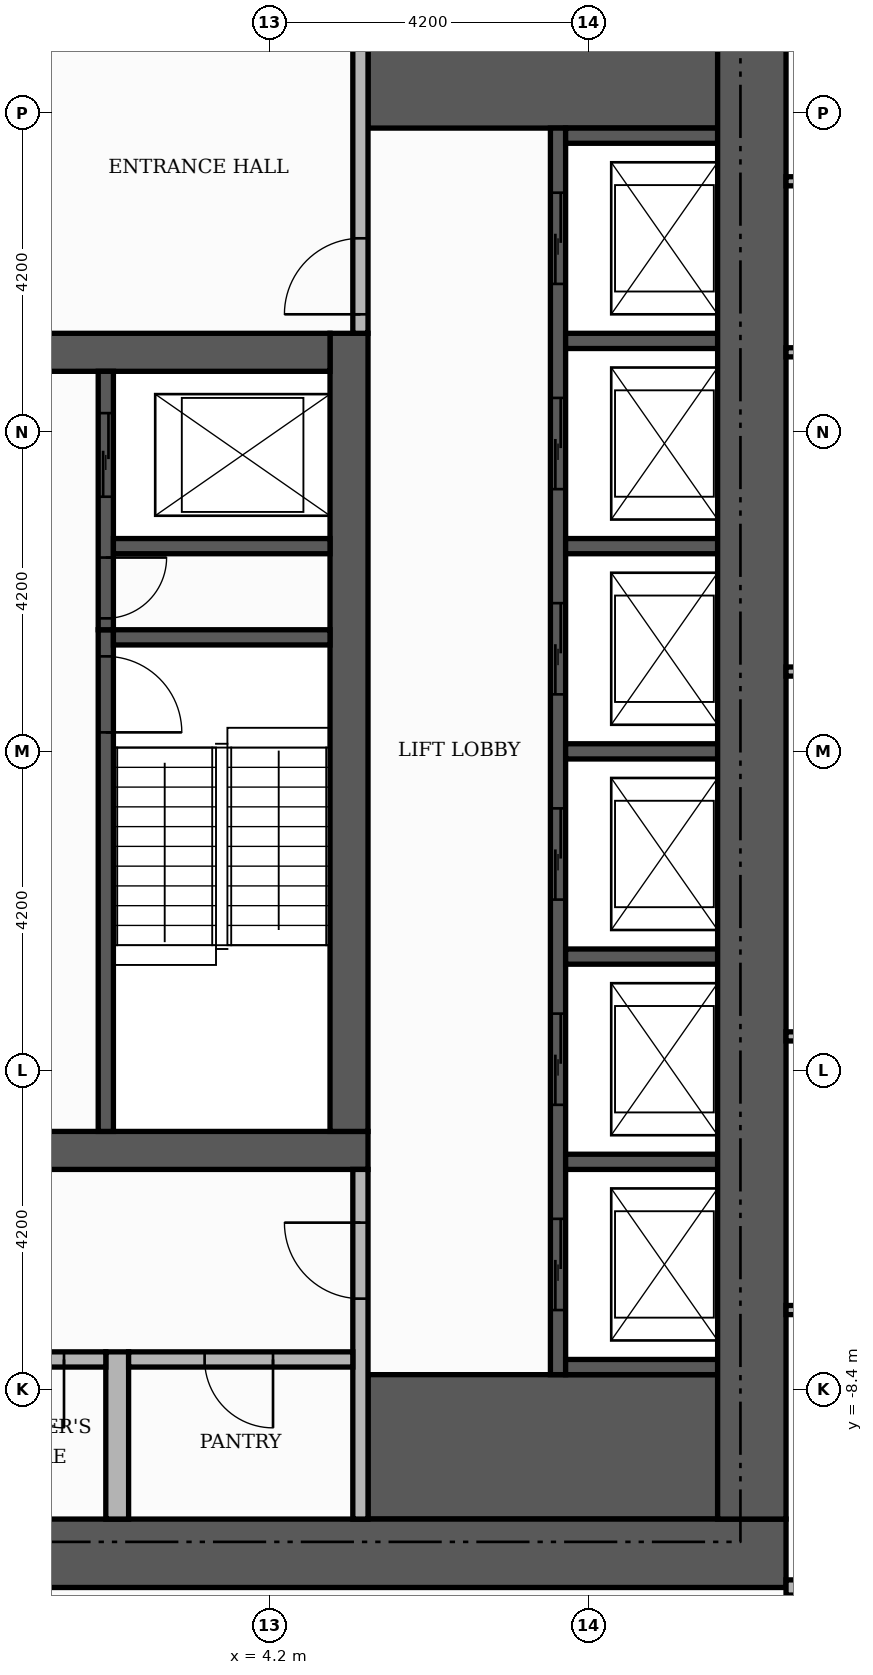
"""IFC4 building model, lengths in metres.
Left out: names, types, materials, properties, quantities, classifications, styles, units other than length and angle.
Written with IfcOpenShell. Run it as: python <this file> out.ifc"""

import sys

from ifc_helpers import new_model, si_unit, direction, frame, frame_2d, origin, place, context, subcontext, project, spatial, rectangle, extrude, element, fill, save


model = new_model("IFC4")
c1 = context("Model", 3, precision=1e-05, world=origin(), true_north=direction((0.0, 1.0)))
c2 = subcontext(c1, "Body", "Model", "MODEL_VIEW")
j1 = project(units=[si_unit("LENGTHUNIT", "METRE"), si_unit("PLANEANGLEUNIT", "RADIAN")], contexts=[c1])
p1 = place(None, origin())
s1 = spatial("IfcSite", under=j1, at=p1, CompositionType="ELEMENT")
p2 = place(p1, origin())
s2 = spatial("IfcBuilding", under=s1, at=p2, CompositionType="ELEMENT")
p3 = place(p2, frame((0.0, 0.0, 149.4)))
s3 = spatial("IfcBuildingStorey", under=s2, at=p3, CompositionType="ELEMENT", Elevation=149.4)
p4 = place(p3, frame((-5.5, -5.25, 0.0), z_axis=(0.0, 0.0, 1.0), x_axis=(1.0, 0.0, 0.0)))
e1 = element("IfcWall", 1, at=p4, inside=s3, PredefinedType="SHEAR", context=c2, shape_type="SweptSolid", body=[
    extrude(rectangle(XDim=11.0, YDim=0.5, at=frame_2d((5.5, 0.0))), origin(), (0.0, 0.0, 1.0), 3.48),
])
p5 = place(p4, frame((4.9, 0.0, 0.0)))
e2 = element("IfcOpeningElement", 2, at=p5, cuts=e1, PredefinedType="OPENING", context=c2, shape_type="SweptSolid", body=[
    extrude(rectangle(XDim=1.2, YDim=2.1, at=frame_2d((0.6, 1.05))), frame((0.0, 0.26, 0.0), z_axis=(0.0, -1.0, 0.0), x_axis=(1.0, 0.0, 0.0)), (0.0, 0.0, 1.0), 0.52),
])
p6 = place(p3, frame((5.25, -5.0, 0.0), z_axis=(0.0, 0.0, 1.0), x_axis=(0.0, 1.0, 0.0)))
e3 = element("IfcWall", 3, at=p6, inside=s3, PredefinedType="SHEAR", context=c2, shape_type="SweptSolid", body=[
    extrude(rectangle(XDim=10.5, YDim=0.5, at=frame_2d((5.25, 0.0))), origin(), (0.0, 0.0, 1.0), 3.48),
])
p7 = place(p3, frame((-5.0, 5.25, 0.0), z_axis=(0.0, 0.0, 1.0), x_axis=(1.0, 0.0, 0.0)))
e4 = element("IfcWall", 4, at=p7, inside=s3, PredefinedType="SHEAR", context=c2, shape_type="SweptSolid", body=[
    extrude(rectangle(XDim=10.0, YDim=0.5, at=frame_2d((5.0, 0.0))), origin(), (0.0, 0.0, 1.0), 3.48),
])
p8 = place(p7, frame((4.4, 0.0, 0.0)))
e5 = element("IfcOpeningElement", 5, at=p8, cuts=e4, PredefinedType="OPENING", context=c2, shape_type="SweptSolid", body=[
    extrude(rectangle(XDim=1.2, YDim=2.1, at=frame_2d((0.6, 1.05))), frame((0.0, 0.26, 0.0), z_axis=(0.0, -1.0, 0.0), x_axis=(1.0, 0.0, 0.0)), (0.0, 0.0, 1.0), 0.52),
])
for number, where, z_axis, x_axis in (
    (6, (5.5, -9.15, 0.0), (0.0, 0.0, 1.0), (1.0, 0.0, 0.0)),
    (7, (5.5, 9.15, 0.0), (0.0, 0.0, 1.0), (1.0, 0.0, 0.0)),
):
    element("IfcWall", number, at=place(p3, frame(where, z_axis=z_axis, x_axis=x_axis)), inside=s3, PredefinedType="SHEAR", context=c2, shape_type="SweptSolid", body=[
        extrude(rectangle(XDim=4.6, YDim=1.9, at=frame_2d((2.3, 0.0))), origin(), (0.0, 0.0, 1.0), 3.48),
    ])
p9 = place(p3, frame((2.05, -5.0, 0.0), z_axis=(0.0, 0.0, 1.0), x_axis=(0.0, 1.0, 0.0)))
e8 = element("IfcWall", 8, at=p9, inside=s3, PredefinedType="SHEAR", context=c2, shape_type="SweptSolid", body=[
    extrude(rectangle(XDim=6.6, YDim=0.2, at=frame_2d((3.3, 0.0))), origin(), (0.0, 0.0, 1.0), 3.48),
])
p10 = place(p9, frame((5.25, 0.0, 0.0)))
e9 = element("IfcOpeningElement", 9, at=p10, cuts=e8, PredefinedType="OPENING", context=c2, shape_type="SweptSolid", body=[
    extrude(rectangle(XDim=1.0, YDim=2.1, at=frame_2d((0.5, 1.05))), frame((0.0, 0.11, 0.0), z_axis=(0.0, -1.0, 0.0), x_axis=(1.0, 0.0, 0.0)), (0.0, 0.0, 1.0), 0.22),
])
p11 = place(p3, frame((2.15, 1.5, 0.0), z_axis=(0.0, 0.0, 1.0), x_axis=(1.0, 0.0, 0.0)))
e10 = element("IfcWall", 10, at=p11, inside=s3, PredefinedType="SHEAR", context=c2, shape_type="SweptSolid", body=[
    extrude(rectangle(XDim=2.85, YDim=0.2, at=frame_2d((1.425, 0.0))), origin(), (0.0, 0.0, 1.0), 3.48),
])
p12 = place(p3, frame((8.0, -8.2, 0.0), z_axis=(0.0, 0.0, 1.0), x_axis=(0.0, 1.0, 0.0)))
e11 = element("IfcWall", 11, at=p12, inside=s3, PredefinedType="SHEAR", context=c2, shape_type="SweptSolid", body=[
    extrude(rectangle(XDim=16.4, YDim=0.2, at=frame_2d((8.2, 0.0))), origin(), (0.0, 0.0, 1.0), 3.48),
])
p13 = place(p12, frame((0.85, 0.0, 0.0)))
e12 = element("IfcOpeningElement", 12, at=p13, cuts=e11, PredefinedType="OPENING", context=c2, shape_type="SweptSolid", body=[
    extrude(rectangle(XDim=1.2, YDim=2.1, at=frame_2d((0.6, 1.05))), frame((0.0, 0.11, 0.0), z_axis=(0.0, -1.0, 0.0), x_axis=(1.0, 0.0, 0.0)), (0.0, 0.0, 1.0), 0.22),
])
p14 = place(p12, frame((3.55, 0.0, 0.0)))
e13 = element("IfcOpeningElement", 13, at=p14, cuts=e11, PredefinedType="OPENING", context=c2, shape_type="SweptSolid", body=[
    extrude(rectangle(XDim=1.2, YDim=2.1, at=frame_2d((0.6, 1.05))), frame((0.0, 0.11, 0.0), z_axis=(0.0, -1.0, 0.0), x_axis=(1.0, 0.0, 0.0)), (0.0, 0.0, 1.0), 0.22),
])
p15 = place(p12, frame((6.25, 0.0, 0.0)))
e14 = element("IfcOpeningElement", 14, at=p15, cuts=e11, PredefinedType="OPENING", context=c2, shape_type="SweptSolid", body=[
    extrude(rectangle(XDim=1.2, YDim=2.1, at=frame_2d((0.6, 1.05))), frame((0.0, 0.11, 0.0), z_axis=(0.0, -1.0, 0.0), x_axis=(1.0, 0.0, 0.0)), (0.0, 0.0, 1.0), 0.22),
])
p16 = place(p12, frame((8.95, 0.0, 0.0)))
e15 = element("IfcOpeningElement", 15, at=p16, cuts=e11, PredefinedType="OPENING", context=c2, shape_type="SweptSolid", body=[
    extrude(rectangle(XDim=1.2, YDim=2.1, at=frame_2d((0.6, 1.05))), frame((0.0, 0.11, 0.0), z_axis=(0.0, -1.0, 0.0), x_axis=(1.0, 0.0, 0.0)), (0.0, 0.0, 1.0), 0.22),
])
p17 = place(p12, frame((11.65, 0.0, 0.0)))
e16 = element("IfcOpeningElement", 16, at=p17, cuts=e11, PredefinedType="OPENING", context=c2, shape_type="SweptSolid", body=[
    extrude(rectangle(XDim=1.2, YDim=2.1, at=frame_2d((0.6, 1.05))), frame((0.0, 0.11, 0.0), z_axis=(0.0, -1.0, 0.0), x_axis=(1.0, 0.0, 0.0)), (0.0, 0.0, 1.0), 0.22),
])
p18 = place(p12, frame((14.35, 0.0, 0.0)))
e17 = element("IfcOpeningElement", 17, at=p18, cuts=e11, PredefinedType="OPENING", context=c2, shape_type="SweptSolid", body=[
    extrude(rectangle(XDim=1.2, YDim=2.1, at=frame_2d((0.6, 1.05))), frame((0.0, 0.11, 0.0), z_axis=(0.0, -1.0, 0.0), x_axis=(1.0, 0.0, 0.0)), (0.0, 0.0, 1.0), 0.22),
])
for number, where, z_axis, x_axis in (
    (18, (8.1, -8.1, 0.0), (0.0, 0.0, 1.0), (1.0, 0.0, 0.0)),
    (19, (8.1, -5.4, 0.0), (0.0, 0.0, 1.0), (1.0, 0.0, 0.0)),
    (20, (8.1, -2.7, 0.0), (0.0, 0.0, 1.0), (1.0, 0.0, 0.0)),
    (21, (8.1, 0.0, 0.0), (0.0, 0.0, 1.0), (1.0, 0.0, 0.0)),
):
    element("IfcWall", number, at=place(p3, frame(where, z_axis=z_axis, x_axis=x_axis)), inside=s3, PredefinedType="SHEAR", context=c2, shape_type="SweptSolid", body=[
        extrude(rectangle(XDim=2.0, YDim=0.2, at=frame_2d((1.0, 0.0))), origin(), (0.0, 0.0, 1.0), 3.48),
    ])
p19 = place(p3, frame((2.05, 1.6, 0.0), z_axis=(0.0, 0.0, 1.0), x_axis=(0.0, 1.0, 0.0)))
e22 = element("IfcWall", 22, at=p19, inside=s3, PredefinedType="SHEAR", context=c2, shape_type="SweptSolid", body=[
    extrude(rectangle(XDim=3.4, YDim=0.2, at=frame_2d((1.7, 0.0))), origin(), (0.0, 0.0, 1.0), 3.48),
])
p20 = place(p19, frame((1.75, 0.0, 0.0)))
e23 = element("IfcOpeningElement", 23, at=p20, cuts=e22, PredefinedType="OPENING", context=c2, shape_type="SweptSolid", body=[
    extrude(rectangle(XDim=1.1, YDim=2.1, at=frame_2d((0.55, 1.05))), frame((0.0, 0.11, 0.0), z_axis=(0.0, -1.0, 0.0), x_axis=(1.0, 0.0, 0.0)), (0.0, 0.0, 1.0), 0.22),
])
p21 = place(p19, frame((0.15, 0.0, 0.0)))
e24 = element("IfcOpeningElement", 24, at=p21, cuts=e22, PredefinedType="OPENING", context=c2, shape_type="SweptSolid", body=[
    extrude(rectangle(XDim=0.8, YDim=2.1, at=frame_2d((0.4, 1.05))), frame((0.0, 0.11, 0.0), z_axis=(0.0, -1.0, 0.0), x_axis=(1.0, 0.0, 0.0)), (0.0, 0.0, 1.0), 0.22),
])
p22 = place(p3, frame((2.15, 2.7, 0.0), z_axis=(0.0, 0.0, 1.0), x_axis=(1.0, 0.0, 0.0)))
e25 = element("IfcWall", 25, at=p22, inside=s3, PredefinedType="SHEAR", context=c2, shape_type="SweptSolid", body=[
    extrude(rectangle(XDim=2.85, YDim=0.2, at=frame_2d((1.425, 0.0))), origin(), (0.0, 0.0, 1.0), 3.48),
])
for number, where, z_axis, x_axis in (
    (26, (8.1, 2.7, 0.0), (0.0, 0.0, 1.0), (1.0, 0.0, 0.0)),
    (27, (8.1, 5.4, 0.0), (0.0, 0.0, 1.0), (1.0, 0.0, 0.0)),
    (28, (8.1, 8.1, 0.0), (0.0, 0.0, 1.0), (1.0, 0.0, 0.0)),
):
    element("IfcWall", number, at=place(p3, frame(where, z_axis=z_axis, x_axis=x_axis)), inside=s3, PredefinedType="SHEAR", context=c2, shape_type="SweptSolid", body=[
        extrude(rectangle(XDim=2.0, YDim=0.2, at=frame_2d((1.0, 0.0))), origin(), (0.0, 0.0, 1.0), 3.48),
    ])
p23 = place(p3, frame((-11.0, -10.55, 0.0), z_axis=(0.0, 0.0, 1.0), x_axis=(1.0, 0.0, 0.0)))
e29 = element("IfcWall", 29, at=p23, inside=s3, PredefinedType="SHEAR", context=c2, shape_type="SweptSolid", body=[
    extrude(rectangle(XDim=22.0, YDim=0.9, at=frame_2d((11.0, 0.0))), origin(), (0.0, 0.0, 1.0), 3.48),
])
p24 = place(p23, frame((7.4, 0.0, 0.0)))
e30 = element("IfcOpeningElement", 30, at=p24, cuts=e29, PredefinedType="OPENING", context=c2, shape_type="SweptSolid", body=[
    extrude(rectangle(XDim=1.8, YDim=2.2, at=frame_2d((0.9, 1.1))), frame((0.0, 0.46, 0.0), z_axis=(0.0, -1.0, 0.0), x_axis=(1.0, 0.0, 0.0)), (0.0, 0.0, 1.0), 0.92),
])
p25 = place(p3, frame((10.55, -10.1, 0.0), z_axis=(0.0, 0.0, 1.0), x_axis=(0.0, 1.0, 0.0)))
e31 = element("IfcWall", 31, at=p25, inside=s3, PredefinedType="SHEAR", context=c2, shape_type="SweptSolid", body=[
    extrude(rectangle(XDim=20.2, YDim=0.9, at=frame_2d((10.1, 0.0))), origin(), (0.0, 0.0, 1.0), 3.48),
])
p26 = place(p3, frame((2.2, -10.1, 0.0), z_axis=(0.0, 0.0, 1.0), x_axis=(0.0, 1.0, 0.0)))
e32 = element("IfcWall", 32, at=p26, inside=s3, PredefinedType="PARTITIONING", context=c2, shape_type="SweptSolid", body=[
    extrude(rectangle(XDim=2.2, YDim=0.3, at=frame_2d((1.1, 0.0))), origin(), (0.0, 0.0, 1.0), 3.48),
])
p27 = place(p3, frame((5.4, -10.1, 0.0), z_axis=(0.0, 0.0, 1.0), x_axis=(0.0, 1.0, 0.0)))
e33 = element("IfcWall", 33, at=p27, inside=s3, PredefinedType="PARTITIONING", context=c2, shape_type="SweptSolid", body=[
    extrude(rectangle(XDim=4.6, YDim=0.2, at=frame_2d((2.3, 0.0))), origin(), (0.0, 0.0, 1.0), 3.48),
])
p28 = place(p27, frame((2.9, 0.0, 0.0)))
e34 = element("IfcOpeningElement", 34, at=p28, cuts=e33, PredefinedType="OPENING", context=c2, shape_type="SweptSolid", body=[
    extrude(rectangle(XDim=1.0, YDim=2.1, at=frame_2d((0.5, 1.05))), frame((0.0, 0.11, 0.0), z_axis=(0.0, -1.0, 0.0), x_axis=(1.0, 0.0, 0.0)), (0.0, 0.0, 1.0), 0.22),
])
p29 = place(p3, frame((0.1, -8.0, 0.0), z_axis=(0.0, 0.0, 1.0), x_axis=(1.0, 0.0, 0.0)))
e35 = element("IfcWall", 35, at=p29, inside=s3, PredefinedType="PARTITIONING", context=c2, shape_type="SweptSolid", body=[
    extrude(rectangle(XDim=1.95, YDim=0.2, at=frame_2d((0.975, 0.0))), origin(), (0.0, 0.0, 1.0), 3.48),
])
p30 = place(p29, frame((0.5, 0.0, 0.0)))
e36 = element("IfcOpeningElement", 36, at=p30, cuts=e35, PredefinedType="OPENING", context=c2, shape_type="SweptSolid", body=[
    extrude(rectangle(XDim=0.9, YDim=2.1, at=frame_2d((0.45, 1.05))), frame((0.0, 0.11, 0.0), z_axis=(0.0, -1.0, 0.0), x_axis=(1.0, 0.0, 0.0)), (0.0, 0.0, 1.0), 0.22),
])
p31 = place(p3, frame((2.35, -8.0, 0.0), z_axis=(0.0, 0.0, 1.0), x_axis=(1.0, 0.0, 0.0)))
e37 = element("IfcWall", 37, at=p31, inside=s3, PredefinedType="PARTITIONING", context=c2, shape_type="SweptSolid", body=[
    extrude(rectangle(XDim=2.95, YDim=0.2, at=frame_2d((1.475, 0.0))), origin(), (0.0, 0.0, 1.0), 3.48),
])
p32 = place(p31, frame((1.0, 0.0, 0.0)))
e38 = element("IfcOpeningElement", 38, at=p32, cuts=e37, PredefinedType="OPENING", context=c2, shape_type="SweptSolid", body=[
    extrude(rectangle(XDim=0.9, YDim=2.1, at=frame_2d((0.45, 1.05))), frame((0.0, 0.11, 0.0), z_axis=(0.0, -1.0, 0.0), x_axis=(1.0, 0.0, 0.0)), (0.0, 0.0, 1.0), 0.22),
])
p33 = place(p3, frame((5.4, 5.5, 0.0), z_axis=(0.0, 0.0, 1.0), x_axis=(0.0, 1.0, 0.0)))
e39 = element("IfcWall", 39, at=p33, inside=s3, PredefinedType="PARTITIONING", context=c2, shape_type="SweptSolid", body=[
    extrude(rectangle(XDim=4.6, YDim=0.2, at=frame_2d((2.3, 0.0))), origin(), (0.0, 0.0, 1.0), 3.48),
])
p34 = place(p33, frame((0.25, 0.0, 0.0)))
e40 = element("IfcOpeningElement", 40, at=p34, cuts=e39, PredefinedType="OPENING", context=c2, shape_type="SweptSolid", body=[
    extrude(rectangle(XDim=1.0, YDim=2.1, at=frame_2d((0.5, 1.05))), frame((0.0, 0.11, 0.0), z_axis=(0.0, -1.0, 0.0), x_axis=(1.0, 0.0, 0.0)), (0.0, 0.0, 1.0), 0.22),
])
p35 = place(p3, frame((11.0, -11.0, 0.0), z_axis=(0.0, 0.0, 1.0), x_axis=(1.0, 0.0, 0.0)))
e41 = element("IfcWall", 41, at=p35, inside=s3, PredefinedType="PARTITIONING", context=c2, shape_type="SweptSolid", body=[
    extrude(rectangle(XDim=2.65, YDim=0.2, at=frame_2d((1.325, 0.0))), origin(), (0.0, 0.0, 1.0), 3.48),
])
p36 = place(p35, frame((0.775, 0.0, 0.0)))
e42 = element("IfcOpeningElement", 42, at=p36, cuts=e41, PredefinedType="OPENING", context=c2, shape_type="SweptSolid", body=[
    extrude(rectangle(XDim=1.1, YDim=2.4, at=frame_2d((0.55, 1.2))), frame((0.0, 0.11, 0.0), z_axis=(0.0, -1.0, 0.0), x_axis=(1.0, 0.0, 0.0)), (0.0, 0.0, 1.0), 0.22),
])
p37 = place(p3, frame((11.0, -7.35, 0.0), z_axis=(0.0, 0.0, 1.0), x_axis=(1.0, 0.0, 0.0)))
e43 = element("IfcWall", 43, at=p37, inside=s3, PredefinedType="PARTITIONING", context=c2, shape_type="SweptSolid", body=[
    extrude(rectangle(XDim=7.32, YDim=0.12, at=frame_2d((3.66, 0.0))), origin(), (0.0, 0.0, 1.0), 3.48),
])
p38 = place(p37, frame((3.21, 0.0, 0.0)))
e44 = element("IfcOpeningElement", 44, at=p38, cuts=e43, PredefinedType="OPENING", context=c2, shape_type="SweptSolid", body=[
    extrude(rectangle(XDim=0.9, YDim=2.1, at=frame_2d((0.45, 1.05))), frame((0.0, 0.07, 0.0), z_axis=(0.0, -1.0, 0.0), x_axis=(1.0, 0.0, 0.0)), (0.0, 0.0, 1.0), 0.14),
])
for number, where, z_axis, x_axis in (
    (45, (11.0, -3.75, 0.0), (0.0, 0.0, 1.0), (1.0, 0.0, 0.0)),
    (46, (11.0, 1.05, 0.0), (0.0, 0.0, 1.0), (1.0, 0.0, 0.0)),
    (47, (11.0, 5.25, 0.0), (0.0, 0.0, 1.0), (1.0, 0.0, 0.0)),
    (48, (11.0, 7.5, 0.0), (0.0, 0.0, 1.0), (1.0, 0.0, 0.0)),
):
    element("IfcWall", number, at=place(p3, frame(where, z_axis=z_axis, x_axis=x_axis)), inside=s3, PredefinedType="PARTITIONING", context=c2, shape_type="SweptSolid", body=[
        extrude(rectangle(XDim=7.32, YDim=0.12, at=frame_2d((3.66, 0.0))), origin(), (0.0, 0.0, 1.0), 3.48),
    ])
p39 = place(p13, origin())
e49 = element("IfcDoor", 49, at=p39, inside=s3, OperationType="SLIDING_TO_LEFT", PredefinedType="DOOR", context=c2, shape_type="SweptSolid", body=[
    extrude(rectangle(XDim=1.2, YDim=2.1, at=frame_2d((0.6, 1.05))), frame((0.0, 0.025, 0.0), z_axis=(0.0, -1.0, 0.0), x_axis=(1.0, 0.0, 0.0)), (0.0, 0.0, 1.0), 0.05),
])
fill(e12, e49)
p40 = place(p14, origin())
e50 = element("IfcDoor", 50, at=p40, inside=s3, OperationType="SLIDING_TO_LEFT", PredefinedType="DOOR", context=c2, shape_type="SweptSolid", body=[
    extrude(rectangle(XDim=1.2, YDim=2.1, at=frame_2d((0.6, 1.05))), frame((0.0, 0.025, 0.0), z_axis=(0.0, -1.0, 0.0), x_axis=(1.0, 0.0, 0.0)), (0.0, 0.0, 1.0), 0.05),
])
fill(e13, e50)
p41 = place(p15, origin())
e51 = element("IfcDoor", 51, at=p41, inside=s3, OperationType="SLIDING_TO_LEFT", PredefinedType="DOOR", context=c2, shape_type="SweptSolid", body=[
    extrude(rectangle(XDim=1.2, YDim=2.1, at=frame_2d((0.6, 1.05))), frame((0.0, 0.025, 0.0), z_axis=(0.0, -1.0, 0.0), x_axis=(1.0, 0.0, 0.0)), (0.0, 0.0, 1.0), 0.05),
])
fill(e14, e51)
p42 = place(p16, origin())
e52 = element("IfcDoor", 52, at=p42, inside=s3, OperationType="SLIDING_TO_LEFT", PredefinedType="DOOR", context=c2, shape_type="SweptSolid", body=[
    extrude(rectangle(XDim=1.2, YDim=2.1, at=frame_2d((0.6, 1.05))), frame((0.0, 0.025, 0.0), z_axis=(0.0, -1.0, 0.0), x_axis=(1.0, 0.0, 0.0)), (0.0, 0.0, 1.0), 0.05),
])
fill(e15, e52)
p43 = place(p17, origin())
e53 = element("IfcDoor", 53, at=p43, inside=s3, OperationType="SLIDING_TO_LEFT", PredefinedType="DOOR", context=c2, shape_type="SweptSolid", body=[
    extrude(rectangle(XDim=1.2, YDim=2.1, at=frame_2d((0.6, 1.05))), frame((0.0, 0.025, 0.0), z_axis=(0.0, -1.0, 0.0), x_axis=(1.0, 0.0, 0.0)), (0.0, 0.0, 1.0), 0.05),
])
fill(e16, e53)
p44 = place(p18, origin())
e54 = element("IfcDoor", 54, at=p44, inside=s3, OperationType="SLIDING_TO_LEFT", PredefinedType="DOOR", context=c2, shape_type="SweptSolid", body=[
    extrude(rectangle(XDim=1.2, YDim=2.1, at=frame_2d((0.6, 1.05))), frame((0.0, 0.025, 0.0), z_axis=(0.0, -1.0, 0.0), x_axis=(1.0, 0.0, 0.0)), (0.0, 0.0, 1.0), 0.05),
])
fill(e17, e54)
p45 = place(p20, origin())
e55 = element("IfcDoor", 55, at=p45, inside=s3, OperationType="SLIDING_TO_LEFT", PredefinedType="DOOR", context=c2, shape_type="SweptSolid", body=[
    extrude(rectangle(XDim=1.1, YDim=2.1, at=frame_2d((0.55, 1.05))), frame((0.0, 0.025, 0.0), z_axis=(0.0, -1.0, 0.0), x_axis=(1.0, 0.0, 0.0)), (0.0, 0.0, 1.0), 0.05),
])
fill(e23, e55)
p46 = place(p10, frame((1.0, 0.0, 0.0), z_axis=(0.0, 0.0, 1.0), x_axis=(-1.0, 0.0, 0.0)))
e56 = element("IfcDoor", 56, at=p46, inside=s3, OperationType="SINGLE_SWING_LEFT", PredefinedType="DOOR", context=c2, shape_type="SweptSolid", body=[
    extrude(rectangle(XDim=1.0, YDim=2.1, at=frame_2d((0.5, 1.05))), frame((0.0, 0.025, 0.0), z_axis=(0.0, -1.0, 0.0), x_axis=(1.0, 0.0, 0.0)), (0.0, 0.0, 1.0), 0.05),
])
fill(e9, e56)
p47 = place(p21, frame((0.8, 0.0, 0.0), z_axis=(0.0, 0.0, 1.0), x_axis=(-1.0, 0.0, 0.0)))
e57 = element("IfcDoor", 57, at=p47, inside=s3, OperationType="SINGLE_SWING_RIGHT", PredefinedType="DOOR", context=c2, shape_type="SweptSolid", body=[
    extrude(rectangle(XDim=0.8, YDim=2.1, at=frame_2d((0.4, 1.05))), frame((0.0, 0.025, 0.0), z_axis=(0.0, -1.0, 0.0), x_axis=(1.0, 0.0, 0.0)), (0.0, 0.0, 1.0), 0.05),
])
fill(e24, e57)
p48 = place(p34, origin())
e58 = element("IfcDoor", 58, at=p48, inside=s3, OperationType="SINGLE_SWING_LEFT", PredefinedType="DOOR", context=c2, shape_type="SweptSolid", body=[
    extrude(rectangle(XDim=1.0, YDim=2.1, at=frame_2d((0.5, 1.05))), frame((0.0, 0.025, 0.0), z_axis=(0.0, -1.0, 0.0), x_axis=(1.0, 0.0, 0.0)), (0.0, 0.0, 1.0), 0.05),
])
fill(e40, e58)
p49 = place(p28, origin())
e59 = element("IfcDoor", 59, at=p49, inside=s3, OperationType="SINGLE_SWING_RIGHT", PredefinedType="DOOR", context=c2, shape_type="SweptSolid", body=[
    extrude(rectangle(XDim=1.0, YDim=2.1, at=frame_2d((0.5, 1.05))), frame((0.0, 0.025, 0.0), z_axis=(0.0, -1.0, 0.0), x_axis=(1.0, 0.0, 0.0)), (0.0, 0.0, 1.0), 0.05),
])
fill(e34, e59)
p50 = place(p30, frame((0.9, 0.0, 0.0), z_axis=(0.0, 0.0, 1.0), x_axis=(-1.0, 0.0, 0.0)))
e60 = element("IfcDoor", 60, at=p50, inside=s3, OperationType="SINGLE_SWING_RIGHT", PredefinedType="DOOR", context=c2, shape_type="SweptSolid", body=[
    extrude(rectangle(XDim=0.9, YDim=2.1, at=frame_2d((0.45, 1.05))), frame((0.0, 0.025, 0.0), z_axis=(0.0, -1.0, 0.0), x_axis=(1.0, 0.0, 0.0)), (0.0, 0.0, 1.0), 0.05),
])
fill(e36, e60)
p51 = place(p32, frame((0.9, 0.0, 0.0), z_axis=(0.0, 0.0, 1.0), x_axis=(-1.0, 0.0, 0.0)))
e61 = element("IfcDoor", 61, at=p51, inside=s3, OperationType="SINGLE_SWING_RIGHT", PredefinedType="DOOR", context=c2, shape_type="SweptSolid", body=[
    extrude(rectangle(XDim=0.9, YDim=2.1, at=frame_2d((0.45, 1.05))), frame((0.0, 0.025, 0.0), z_axis=(0.0, -1.0, 0.0), x_axis=(1.0, 0.0, 0.0)), (0.0, 0.0, 1.0), 0.05),
])
fill(e38, e61)
save(model, sys.argv[1])
